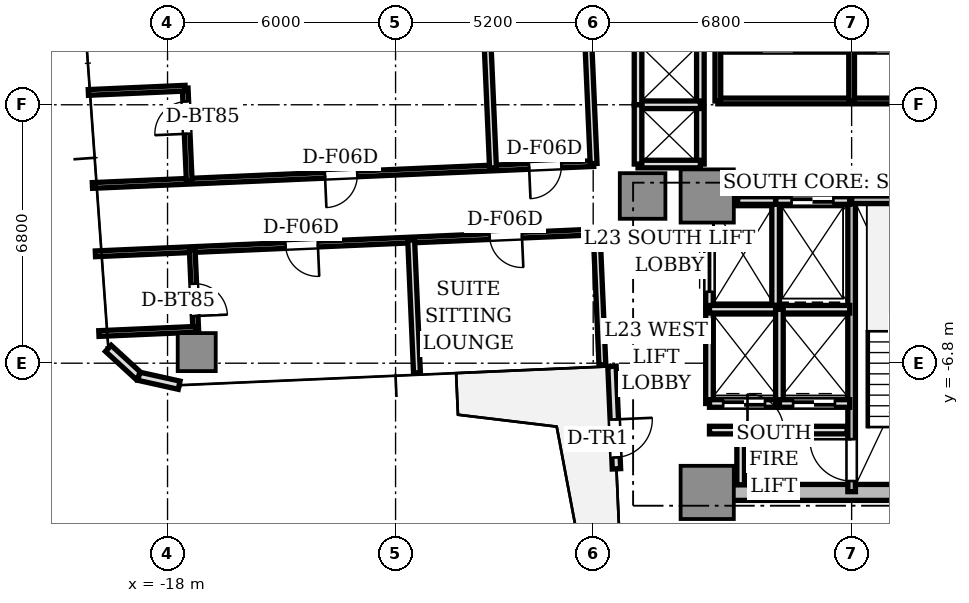
"""IFC4 building model, lengths in metres.
Left out: names, types, materials, properties, quantities, classifications, styles, units other than length and angle.
Written with IfcOpenShell. Run it as: python <this file> out.ifc"""

import sys

from ifc_helpers import new_model, si_unit, direction, frame, frame_2d, origin, origin_2d, place, context, subcontext, project, spatial, rectangle, extrude, source, transform, mapped, element, fill, save


model = new_model("IFC4")
c1 = context("Model", 3, precision=1e-05, world=origin(), true_north=direction((0.0, 1.0)))
c2 = subcontext(c1, "Body", "Model", "MODEL_VIEW")
j1 = project(units=[si_unit("LENGTHUNIT", "METRE"), si_unit("PLANEANGLEUNIT", "RADIAN")], contexts=[c1])
p1 = place(None, origin())
s1 = spatial("IfcSite", under=j1, at=p1, CompositionType="ELEMENT")
p2 = place(p1, origin())
s2 = spatial("IfcBuilding", under=s1, at=p2, CompositionType="ELEMENT")
p3 = place(p2, frame((0.0, 0.0, 86.85)))
s3 = spatial("IfcBuildingStorey", under=s2, at=p3, CompositionType="ELEMENT", Elevation=86.85)
p4 = place(p3, frame((-3.55, -10.2, 0.0), z_axis=(0.0, 0.0, 1.0), x_axis=(1.0, 0.0, 0.0)))
e1 = element("IfcWall", 1, at=p4, inside=s3, PredefinedType="SHEAR", context=c2, shape_type="SweptSolid", body=[
    extrude(rectangle(XDim=7.1, YDim=0.42, at=frame_2d((3.55, 0.0))), origin(), (0.0, 0.0, 1.0), 3.11),
])
m1 = source(origin(), c2, "Body", "SweptSolid", [
    extrude(rectangle(XDim=1.4, YDim=1.4, at=origin_2d()), origin(), (0.0, 0.0, 1.0), 3.11),
])
for number, where, z_axis, x_axis in (
    (2, (-3.8, -2.4, 0.0), (0.0, 0.0, 1.0), (1.0, 0.0, 0.0)),
    (3, (-3.8, -10.2, 0.0), (0.0, 0.0, 1.0), (1.0, 0.0, 0.0)),
):
    element("IfcColumn", number, at=place(p3, frame(where, z_axis=z_axis, x_axis=x_axis)), inside=s3, PredefinedType="COLUMN", context=c2, shape_type="MappedRepresentation", body=[
        mapped(m1, transform((0.0, 0.0, 0.0), scale=1.0)),
    ])
m2 = source(origin(), c2, "Body", "SweptSolid", [
    extrude(rectangle(XDim=1.2, YDim=1.2, at=origin_2d()), origin(), (0.0, 0.0, 1.0), 3.11),
])
p5 = place(p3, frame((-5.5, -2.4, 0.0), z_axis=(0.0, 0.0, 1.0), x_axis=(1.0, 0.0, 0.0)))
e4 = element("IfcColumn", 4, at=p5, inside=s3, PredefinedType="COLUMN", context=c2, shape_type="MappedRepresentation", body=[
    mapped(m2, transform((0.0, 0.0, 0.0), scale=1.0)),
])
m3 = source(origin(), c2, "Body", "SweptSolid", [
    extrude(rectangle(XDim=1.0, YDim=1.0, at=origin_2d()), origin(), (0.0, 0.0, 1.0), 3.11),
])
p6 = place(p3, frame((-17.232, -6.508, 0.0), z_axis=(0.0, 0.0, 1.0), x_axis=(1.0, 0.0, 0.0)))
e5 = element("IfcColumn", 5, at=p6, inside=s3, PredefinedType="COLUMN", context=c2, shape_type="MappedRepresentation", body=[
    mapped(m3, transform((0.0, 0.0, 0.0), scale=1.0)),
])
p7 = place(p3, frame((-19.558, -6.409, 0.0), z_axis=(0.0, 0.0, 1.0), x_axis=(0.737210081318, -0.675663596772, 0.0)))
e6 = element("IfcWall", 6, at=p7, inside=s3, PredefinedType="STANDARD", context=c2, shape_type="SweptSolid", body=[
    extrude(rectangle(XDim=1.087, YDim=0.22, at=frame_2d((0.543, 0.0))), origin(), (0.0, 0.0, 1.0), 3.11),
])
p8 = place(p3, frame((-18.756, -7.144, 0.0), z_axis=(0.0, 0.0, 1.0), x_axis=(0.976282085775, -0.216502399514, 0.0)))
e7 = element("IfcWall", 7, at=p8, inside=s3, PredefinedType="STANDARD", context=c2, shape_type="SweptSolid", body=[
    extrude(rectangle(XDim=1.087, YDim=0.22, at=frame_2d((0.543, 0.0))), origin(), (0.0, 0.0, 1.0), 3.11),
])
p9 = place(p3, frame((-6.306, -6.882, 0.0), z_axis=(0.0, 0.0, 1.0), x_axis=(0.043672655174, -0.999045894436, 0.0)))
e8 = element("IfcWall", 8, at=p9, inside=s3, PredefinedType="STANDARD", context=c2, shape_type="SweptSolid", body=[
    extrude(rectangle(XDim=2.7, YDim=0.22, at=frame_2d((1.35, 0.0))), origin(), (0.0, 0.0, 1.0), 3.11),
])
p10 = place(p9, frame((1.4, 0.0, 0.0)))
e9 = element("IfcOpeningElement", 9, at=p10, cuts=e8, PredefinedType="OPENING", context=c2, shape_type="SweptSolid", body=[
    extrude(rectangle(XDim=1.0, YDim=2.2, at=frame_2d((0.5, 1.1))), frame((0.0, 0.12, 0.0), z_axis=(0.0, -1.0, 0.0), x_axis=(1.0, 0.0, 0.0)), (0.0, 0.0, 1.0), 0.24),
])
p11 = place(p3, frame((0.0, -10.18, 0.0), z_axis=(0.0, 0.0, 1.0), x_axis=(0.0, 1.0, 0.0)))
e10 = element("IfcWall", 10, at=p11, inside=s3, PredefinedType="SOLIDWALL", context=c2, shape_type="SweptSolid", body=[
    extrude(rectangle(XDim=7.68, YDim=0.2, at=frame_2d((3.84, 0.0))), origin(), (0.0, 0.0, 1.0), 3.11),
])
p12 = place(p11, frame((0.28, 0.0, 0.0)))
e11 = element("IfcOpeningElement", 11, at=p12, cuts=e10, PredefinedType="OPENING", context=c2, shape_type="SweptSolid", body=[
    extrude(rectangle(XDim=1.1, YDim=2.15, at=frame_2d((0.55, 1.075))), frame((0.0, 0.11, 0.0), z_axis=(0.0, -1.0, 0.0), x_axis=(1.0, 0.0, 0.0)), (0.0, 0.0, 1.0), 0.22),
])
p13 = place(p3, frame((0.0, -2.5, 0.0), z_axis=(0.0, 0.0, 1.0), x_axis=(1.0, 0.0, 0.0)))
e12 = element("IfcWall", 12, at=p13, inside=s3, PredefinedType="SOLIDWALL", context=c2, shape_type="SweptSolid", body=[
    extrude(rectangle(XDim=3.72, YDim=0.2, at=frame_2d((1.86, 0.0))), origin(), (0.0, 0.0, 1.0), 3.11),
])
p14 = place(p3, frame((-2.0, -5.28, 0.0), z_axis=(0.0, 0.0, 1.0), x_axis=(0.0, 1.0, 0.0)))
e13 = element("IfcWall", 13, at=p14, inside=s3, PredefinedType="SOLIDWALL", context=c2, shape_type="SweptSolid", body=[
    extrude(rectangle(XDim=2.78, YDim=0.2, at=frame_2d((1.39, 0.0))), origin(), (0.0, 0.0, 1.0), 2.66),
])
p15 = place(p3, frame((-2.0, -2.52, 0.0), z_axis=(0.0, 0.0, 1.0), x_axis=(1.0, 0.0, 0.0)))
e14 = element("IfcWall", 14, at=p15, inside=s3, PredefinedType="SOLIDWALL", context=c2, shape_type="SweptSolid", body=[
    extrude(rectangle(XDim=1.95, YDim=0.2, at=frame_2d((0.975, 0.0))), origin(), (0.0, 0.0, 1.0), 2.66),
])
p16 = place(p15, frame((0.42, 0.0, 0.0)))
e15 = element("IfcOpeningElement", 15, at=p16, cuts=e14, PredefinedType="OPENING", context=c2, shape_type="SweptSolid", body=[
    extrude(rectangle(XDim=1.1, YDim=2.2, at=frame_2d((0.55, 1.1))), frame((0.0, 0.11, 0.0), z_axis=(0.0, -1.0, 0.0), x_axis=(1.0, 0.0, 0.0)), (0.0, 0.0, 1.0), 0.22),
])
p17 = place(p3, frame((-3.0, -2.52, 0.0), z_axis=(0.0, 0.0, 1.0), x_axis=(1.0, 0.0, 0.0)))
e16 = element("IfcWall", 16, at=p17, inside=s3, PredefinedType="SOLIDWALL", context=c2, shape_type="SweptSolid", body=[
    extrude(rectangle(XDim=1.0, YDim=0.2, at=frame_2d((0.5, 0.0))), origin(), (0.0, 0.0, 1.0), 2.66),
])
p18 = place(p3, frame((-3.74, -5.36, 0.0), z_axis=(0.0, 0.0, 1.0), x_axis=(0.0, 1.0, 0.0)))
e17 = element("IfcWall", 17, at=p18, inside=s3, PredefinedType="SOLIDWALL", context=c2, shape_type="SweptSolid", body=[
    extrude(rectangle(XDim=2.08, YDim=0.2, at=frame_2d((1.04, 0.0))), origin(), (0.0, 0.0, 1.0), 2.66),
])
p19 = place(p18, frame((0.44, 0.0, 0.0)))
e18 = element("IfcOpeningElement", 18, at=p19, cuts=e17, PredefinedType="OPENING", context=c2, shape_type="SweptSolid", body=[
    extrude(rectangle(XDim=1.2, YDim=2.2, at=frame_2d((0.6, 1.1))), frame((0.0, 0.11, 0.0), z_axis=(0.0, -1.0, 0.0), x_axis=(1.0, 0.0, 0.0)), (0.0, 0.0, 1.0), 0.22),
])
p20 = place(p3, frame((-3.74, -7.86, 0.0), z_axis=(0.0, 0.0, 1.0), x_axis=(0.0, 1.0, 0.0)))
e19 = element("IfcWall", 19, at=p20, inside=s3, PredefinedType="SOLIDWALL", context=c2, shape_type="SweptSolid", body=[
    extrude(rectangle(XDim=2.48, YDim=0.2, at=frame_2d((1.24, 0.0))), origin(), (0.0, 0.0, 1.0), 2.66),
])
p21 = place(p3, frame((-3.74, -7.86, 0.0), z_axis=(0.0, 0.0, 1.0), x_axis=(1.0, 0.0, 0.0)))
e20 = element("IfcWall", 20, at=p21, inside=s3, PredefinedType="SOLIDWALL", context=c2, shape_type="SweptSolid", body=[
    extrude(rectangle(XDim=1.84, YDim=0.2, at=frame_2d((0.92, 0.0))), origin(), (0.0, 0.0, 1.0), 2.66),
])
p22 = place(p21, frame((0.36, 0.0, 0.0)))
e21 = element("IfcOpeningElement", 21, at=p22, cuts=e20, PredefinedType="OPENING", context=c2, shape_type="SweptSolid", body=[
    extrude(rectangle(XDim=1.1, YDim=2.2, at=frame_2d((0.55, 1.1))), frame((0.0, 0.11, 0.0), z_axis=(0.0, -1.0, 0.0), x_axis=(1.0, 0.0, 0.0)), (0.0, 0.0, 1.0), 0.22),
])
p23 = place(p3, frame((-3.74, -5.38, 0.0), z_axis=(0.0, 0.0, 1.0), x_axis=(1.0, 0.0, 0.0)))
e22 = element("IfcWall", 22, at=p23, inside=s3, PredefinedType="SOLIDWALL", context=c2, shape_type="SweptSolid", body=[
    extrude(rectangle(XDim=3.69, YDim=0.2, at=frame_2d((1.845, 0.0))), origin(), (0.0, 0.0, 1.0), 2.66),
])
p24 = place(p3, frame((-1.9, -7.86, 0.0), z_axis=(0.0, 0.0, 1.0), x_axis=(0.0, 1.0, 0.0)))
e23 = element("IfcWall", 23, at=p24, inside=s3, PredefinedType="SOLIDWALL", context=c2, shape_type="SweptSolid", body=[
    extrude(rectangle(XDim=2.48, YDim=0.2, at=frame_2d((1.24, 0.0))), origin(), (0.0, 0.0, 1.0), 2.66),
])
p25 = place(p3, frame((-1.9, -7.86, 0.0), z_axis=(0.0, 0.0, 1.0), x_axis=(1.0, 0.0, 0.0)))
e24 = element("IfcWall", 24, at=p25, inside=s3, PredefinedType="SOLIDWALL", context=c2, shape_type="SweptSolid", body=[
    extrude(rectangle(XDim=1.85, YDim=0.2, at=frame_2d((0.925, 0.0))), origin(), (0.0, 0.0, 1.0), 2.66),
])
p26 = place(p25, frame((0.36, 0.0, 0.0)))
e25 = element("IfcOpeningElement", 25, at=p26, cuts=e24, PredefinedType="OPENING", context=c2, shape_type="SweptSolid", body=[
    extrude(rectangle(XDim=1.1, YDim=2.2, at=frame_2d((0.55, 1.1))), frame((0.0, 0.11, 0.0), z_axis=(0.0, -1.0, 0.0), x_axis=(1.0, 0.0, 0.0)), (0.0, 0.0, 1.0), 0.22),
])
p27 = place(p3, frame((-3.98, -1.56, 0.0), z_axis=(0.0, 0.0, 1.0), x_axis=(0.0, 1.0, 0.0)))
e26 = element("IfcWall", 26, at=p27, inside=s3, PredefinedType="SOLIDWALL", context=c2, shape_type="SweptSolid", body=[
    extrude(rectangle(XDim=3.12, YDim=0.2, at=frame_2d((1.56, 0.0))), origin(), (0.0, 0.0, 1.0), 2.28),
])
for number, where, z_axis, x_axis in (
    (27, (-5.62, -1.56, 0.0), (0.0, 0.0, 1.0), (1.0, 0.0, 0.0)),
    (28, (-5.62, 0.0, 0.0), (0.0, 0.0, 1.0), (1.0, 0.0, 0.0)),
):
    element("IfcWall", number, at=place(p3, frame(where, z_axis=z_axis, x_axis=x_axis)), inside=s3, PredefinedType="SOLIDWALL", context=c2, shape_type="SweptSolid", body=[
        extrude(rectangle(XDim=1.64, YDim=0.2, at=frame_2d((0.82, 0.0))), origin(), (0.0, 0.0, 1.0), 2.66),
    ])
for number, where, z_axis, x_axis in (
    (29, (-5.62, 0.0, 0.0), (0.0, 0.0, 1.0), (0.0, 1.0, 0.0)),
    (30, (-5.62, -1.56, 0.0), (0.0, 0.0, 1.0), (0.0, 1.0, 0.0)),
):
    element("IfcWall", number, at=place(p3, frame(where, z_axis=z_axis, x_axis=x_axis)), inside=s3, PredefinedType="SOLIDWALL", context=c2, shape_type="SweptSolid", body=[
        extrude(rectangle(XDim=1.56, YDim=0.2, at=frame_2d((0.78, 0.0))), origin(), (0.0, 0.0, 1.0), 2.66),
    ])
p28 = place(p3, frame((-3.74, -8.56, 0.0), z_axis=(0.0, 0.0, 1.0), x_axis=(1.0, 0.0, 0.0)))
e31 = element("IfcWall", 31, at=p28, inside=s3, PredefinedType="SOLIDWALL", context=c2, shape_type="SweptSolid", body=[
    extrude(rectangle(XDim=3.62, YDim=0.2, at=frame_2d((1.81, 0.0))), origin(), (0.0, 0.0, 1.0), 2.66),
])
p29 = place(p28, frame((1.0, 0.0, 0.0)))
e32 = element("IfcOpeningElement", 32, at=p29, cuts=e31, PredefinedType="OPENING", context=c2, shape_type="SweptSolid", body=[
    extrude(rectangle(XDim=0.95, YDim=2.15, at=frame_2d((0.475, 1.075))), frame((0.0, 0.11, 0.0), z_axis=(0.0, -1.0, 0.0), x_axis=(1.0, 0.0, 0.0)), (0.0, 0.0, 1.0), 0.22),
])
p30 = place(p3, frame((-2.92, -10.0, 0.0), z_axis=(0.0, 0.0, 1.0), x_axis=(0.0, 1.0, 0.0)))
e33 = element("IfcWall", 33, at=p30, inside=s3, PredefinedType="SOLIDWALL", context=c2, shape_type="SweptSolid", body=[
    extrude(rectangle(XDim=1.44, YDim=0.2, at=frame_2d((0.72, 0.0))), origin(), (0.0, 0.0, 1.0), 2.66),
])
p31 = place(p3, frame((-3.52, 0.1, 0.0), z_axis=(0.0, 0.0, 1.0), x_axis=(1.0, 0.0, 0.0)))
e34 = element("IfcWall", 34, at=p31, inside=s3, PredefinedType="PARTITIONING", context=c2, shape_type="SweptSolid", body=[
    extrude(rectangle(XDim=5.68, YDim=0.15, at=frame_2d((2.84, 0.0))), origin(), (0.0, 0.0, 1.0), 2.66),
])
p32 = place(p3, frame((-3.52, 0.1, 0.0), z_axis=(0.0, 0.0, 1.0), x_axis=(0.0, 1.0, 0.0)))
e35 = element("IfcWall", 35, at=p32, inside=s3, PredefinedType="PARTITIONING", context=c2, shape_type="SweptSolid", body=[
    extrude(rectangle(XDim=1.36, YDim=0.15, at=frame_2d((0.68, 0.0))), origin(), (0.0, 0.0, 1.0), 2.28),
])
p33 = place(p3, frame((0.0, 0.1, 0.0), z_axis=(0.0, 0.0, 1.0), x_axis=(0.0, 1.0, 0.0)))
e36 = element("IfcWall", 36, at=p33, inside=s3, PredefinedType="PARTITIONING", context=c2, shape_type="SweptSolid", body=[
    extrude(rectangle(XDim=1.36, YDim=0.15, at=frame_2d((0.68, 0.0))), origin(), (0.0, 0.0, 1.0), 2.66),
])
p34 = place(p3, frame((-6.71, -3.346, 0.0), z_axis=(0.0, 0.0, 1.0), x_axis=(-0.999048535483, -0.04361219725, 0.0)))
e37 = element("IfcWall", 37, at=p34, inside=s3, PredefinedType="PARTITIONING", context=c2, shape_type="SweptSolid", body=[
    extrude(rectangle(XDim=13.2, YDim=0.15, at=frame_2d((6.6, 0.0))), origin(), (0.0, 0.0, 1.0), 2.63),
])
p35 = place(p34, frame((1.967, 0.0, 0.0)))
e38 = element("IfcOpeningElement", 38, at=p35, cuts=e37, PredefinedType="OPENING", context=c2, shape_type="SweptSolid", body=[
    extrude(rectangle(XDim=0.85, YDim=2.1, at=frame_2d((0.425, 1.05))), frame((0.0, 0.085, 0.0), z_axis=(0.0, -1.0, 0.0), x_axis=(1.0, 0.0, 0.0)), (0.0, 0.0, 1.0), 0.17),
])
p36 = place(p34, frame((7.342, 0.0, 0.0)))
e39 = element("IfcOpeningElement", 39, at=p36, cuts=e37, PredefinedType="OPENING", context=c2, shape_type="SweptSolid", body=[
    extrude(rectangle(XDim=0.85, YDim=2.1, at=frame_2d((0.425, 1.05))), frame((0.0, 0.085, 0.0), z_axis=(0.0, -1.0, 0.0), x_axis=(1.0, 0.0, 0.0)), (0.0, 0.0, 1.0), 0.17),
])
p37 = place(p3, frame((-6.789, -1.548, 0.0), z_axis=(0.0, 0.0, 1.0), x_axis=(-0.999048500303, -0.043613003123, 0.0)))
e40 = element("IfcWall", 40, at=p37, inside=s3, PredefinedType="PARTITIONING", context=c2, shape_type="SweptSolid", body=[
    extrude(rectangle(XDim=13.2, YDim=0.15, at=frame_2d((6.6, 0.0))), origin(), (0.0, 0.0, 1.0), 2.66),
])
p38 = place(p37, frame((0.85, 0.0, 0.0)))
e41 = element("IfcOpeningElement", 41, at=p38, cuts=e40, PredefinedType="OPENING", context=c2, shape_type="SweptSolid", body=[
    extrude(rectangle(XDim=0.85, YDim=2.1, at=frame_2d((0.425, 1.05))), frame((0.0, 0.085, 0.0), z_axis=(0.0, -1.0, 0.0), x_axis=(1.0, 0.0, 0.0)), (0.0, 0.0, 1.0), 0.17),
])
p39 = place(p37, frame((6.225, 0.0, 0.0)))
e42 = element("IfcOpeningElement", 42, at=p39, cuts=e40, PredefinedType="OPENING", context=c2, shape_type="SweptSolid", body=[
    extrude(rectangle(XDim=0.85, YDim=2.1, at=frame_2d((0.425, 1.05))), frame((0.0, 0.085, 0.0), z_axis=(0.0, -1.0, 0.0), x_axis=(1.0, 0.0, 0.0)), (0.0, 0.0, 1.0), 0.17),
])
p40 = place(p3, frame((-6.71, -3.346, 0.0), z_axis=(0.0, 0.0, 1.0), x_axis=(0.043597663116, -0.999049169846, 0.0)))
e43 = element("IfcWall", 43, at=p40, inside=s3, PredefinedType="PARTITIONING", context=c2, shape_type="SweptSolid", body=[
    extrude(rectangle(XDim=3.5, YDim=0.18, at=frame_2d((1.75, 0.0))), origin(), (0.0, 0.0, 1.0), 2.66),
])
p41 = place(p3, frame((-7.129, 6.245, 0.0), z_axis=(0.0, 0.0, 1.0), x_axis=(0.043600217373, -0.999049058378, 0.0)))
e44 = element("IfcWall", 44, at=p41, inside=s3, PredefinedType="PARTITIONING", context=c2, shape_type="SweptSolid", body=[
    extrude(rectangle(XDim=7.8, YDim=0.18, at=frame_2d((3.9, 0.0))), origin(), (0.0, 0.0, 1.0), 2.66),
])
p42 = place(p3, frame((-11.59, -3.559, 0.0), z_axis=(0.0, 0.0, 1.0), x_axis=(0.04366424353, -0.99904626211, 0.0)))
e45 = element("IfcWall", 45, at=p42, inside=s3, PredefinedType="PARTITIONING", context=c2, shape_type="SweptSolid", body=[
    extrude(rectangle(XDim=3.5, YDim=0.18, at=frame_2d((1.75, 0.0))), origin(), (0.0, 0.0, 1.0), 2.66),
])
p43 = place(p3, frame((-17.35, -3.81, 0.0), z_axis=(0.0, 0.0, 1.0), x_axis=(0.043593612401, -0.999049346608, 0.0)))
e46 = element("IfcWall", 46, at=p43, inside=s3, PredefinedType="PARTITIONING", context=c2, shape_type="SweptSolid", body=[
    extrude(rectangle(XDim=2.1, YDim=0.15, at=frame_2d((1.05, 0.0))), origin(), (0.0, 0.0, 1.0), 2.58),
])
p44 = place(p43, frame((0.9, 0.0, 0.0)))
e47 = element("IfcOpeningElement", 47, at=p44, cuts=e46, PredefinedType="OPENING", context=c2, shape_type="SweptSolid", body=[
    extrude(rectangle(XDim=0.85, YDim=2.1, at=frame_2d((0.425, 1.05))), frame((0.0, 0.085, 0.0), z_axis=(0.0, -1.0, 0.0), x_axis=(1.0, 0.0, 0.0)), (0.0, 0.0, 1.0), 0.17),
])
p45 = place(p3, frame((-17.259, -5.908, 0.0), z_axis=(0.0, 0.0, 1.0), x_axis=(-0.999046560091, -0.043657425146, 0.0)))
e48 = element("IfcWall", 48, at=p45, inside=s3, PredefinedType="PARTITIONING", context=c2, shape_type="SweptSolid", body=[
    extrude(rectangle(XDim=2.55, YDim=0.15, at=frame_2d((1.275, 0.0))), origin(), (0.0, 0.0, 1.0), 2.66),
])
p46 = place(p3, frame((-9.436, -1.663, 0.0), z_axis=(0.0, 0.0, 1.0), x_axis=(-0.043632821702, 0.999047634936, 0.0)))
e49 = element("IfcWall", 49, at=p46, inside=s3, PredefinedType="PARTITIONING", context=c2, shape_type="SweptSolid", body=[
    extrude(rectangle(XDim=7.8, YDim=0.18, at=frame_2d((3.9, 0.0))), origin(), (0.0, 0.0, 1.0), 2.66),
])
p47 = place(p3, frame((-17.429, -2.012, 0.0), z_axis=(0.0, 0.0, 1.0), x_axis=(-0.043644787072, 0.999047112283, 0.0)))
e50 = element("IfcWall", 50, at=p47, inside=s3, PredefinedType="PARTITIONING", context=c2, shape_type="SweptSolid", body=[
    extrude(rectangle(XDim=2.45, YDim=0.15, at=frame_2d((1.225, 0.0))), origin(), (0.0, 0.0, 1.0), 2.58),
])
p48 = place(p47, frame((1.25, 0.0, 0.0)))
e51 = element("IfcOpeningElement", 51, at=p48, cuts=e50, PredefinedType="OPENING", context=c2, shape_type="SweptSolid", body=[
    extrude(rectangle(XDim=0.85, YDim=2.1, at=frame_2d((0.425, 1.05))), frame((0.0, 0.085, 0.0), z_axis=(0.0, -1.0, 0.0), x_axis=(1.0, 0.0, 0.0)), (0.0, 0.0, 1.0), 0.17),
])
p49 = place(p3, frame((-17.536, 0.436, 0.0), z_axis=(0.0, 0.0, 1.0), x_axis=(-0.999046560091, -0.043657425146, 0.0)))
e52 = element("IfcWall", 52, at=p49, inside=s3, PredefinedType="PARTITIONING", context=c2, shape_type="SweptSolid", body=[
    extrude(rectangle(XDim=2.55, YDim=0.15, at=frame_2d((1.275, 0.0))), origin(), (0.0, 0.0, 1.0), 2.66),
])
p50 = place(p3, frame((-3.851, -11.529, 0.0), z_axis=(0.0, 0.0, 1.0), x_axis=(0.999048663393, 0.043609267053, 0.0)))
e53 = element("IfcWall", 53, at=p50, inside=s3, PredefinedType="PARTITIONING", context=c2, shape_type="SweptSolid", body=[
    extrude(rectangle(XDim=10.9, YDim=0.18, at=frame_2d((5.45, 0.0))), origin(), (0.0, 0.0, 1.0), 2.66),
])
m4 = source(origin(), c2, "Body", "SweptSolid", [
    extrude(rectangle(XDim=1.0, YDim=0.05, at=origin_2d()), origin(), (0.0, 0.0, 1.0), 2.2),
])
p51 = place(p10, frame((0.5, 0.0, 0.0)))
e54 = element("IfcDoor", 54, at=p51, inside=s3, OperationType="SINGLE_SWING_LEFT", PredefinedType="DOOR", context=c2, shape_type="MappedRepresentation", body=[
    mapped(m4, transform((0.0, 0.0, 0.0), scale=1.0)),
])
fill(e9, e54)
m5 = source(origin(), c2, "Body", "SweptSolid", [
    extrude(rectangle(XDim=1.1, YDim=0.05, at=origin_2d()), origin(), (0.0, 0.0, 1.0), 2.2),
])
p52 = place(p16, frame((0.55, 0.0, 0.0)))
e55 = element("IfcDoor", 55, at=p52, inside=s3, OperationType="DOUBLE_DOOR_SLIDING", PredefinedType="DOOR", context=c2, shape_type="MappedRepresentation", body=[
    mapped(m5, transform((0.0, 0.0, 0.0), scale=1.0)),
])
fill(e15, e55)
m6 = source(origin(), c2, "Body", "SweptSolid", [
    extrude(rectangle(XDim=1.2, YDim=0.05, at=origin_2d()), origin(), (0.0, 0.0, 1.0), 2.2),
])
p53 = place(p19, frame((0.6, 0.0, 0.0)))
e56 = element("IfcDoor", 56, at=p53, inside=s3, OperationType="DOUBLE_DOOR_SLIDING", PredefinedType="DOOR", context=c2, shape_type="MappedRepresentation", body=[
    mapped(m6, transform((0.0, 0.0, 0.0), scale=1.0)),
])
fill(e18, e56)
p54 = place(p22, frame((0.55, 0.0, 0.0)))
e57 = element("IfcDoor", 57, at=p54, inside=s3, OperationType="DOUBLE_DOOR_SLIDING", PredefinedType="DOOR", context=c2, shape_type="MappedRepresentation", body=[
    mapped(m5, transform((0.0, 0.0, 0.0), scale=1.0)),
])
fill(e21, e57)
p55 = place(p26, frame((0.55, 0.0, 0.0)))
e58 = element("IfcDoor", 58, at=p55, inside=s3, OperationType="DOUBLE_DOOR_SLIDING", PredefinedType="DOOR", context=c2, shape_type="MappedRepresentation", body=[
    mapped(m5, transform((0.0, 0.0, 0.0), scale=1.0)),
])
fill(e25, e58)
m7 = source(origin(), c2, "Body", "SweptSolid", [
    extrude(rectangle(XDim=1.1, YDim=0.05, at=origin_2d()), origin(), (0.0, 0.0, 1.0), 2.15),
])
p56 = place(p12, frame((0.55, 0.0, 0.0)))
e59 = element("IfcDoor", 59, at=p56, inside=s3, OperationType="SINGLE_SWING_RIGHT", PredefinedType="DOOR", context=c2, shape_type="MappedRepresentation", body=[
    mapped(m7, transform((0.0, 0.0, 0.0), scale=1.0)),
])
fill(e11, e59)
m8 = source(origin(), c2, "Body", "SweptSolid", [
    extrude(rectangle(XDim=0.95, YDim=0.05, at=origin_2d()), origin(), (0.0, 0.0, 1.0), 2.15),
])
p57 = place(p29, frame((0.475, 0.0, 0.0)))
e60 = element("IfcDoor", 60, at=p57, inside=s3, OperationType="SINGLE_SWING_LEFT", PredefinedType="DOOR", context=c2, shape_type="MappedRepresentation", body=[
    mapped(m8, transform((0.0, 0.0, 0.0), scale=1.0)),
])
fill(e32, e60)
m9 = source(origin(), c2, "Body", "SweptSolid", [
    extrude(rectangle(XDim=0.85, YDim=0.05, at=origin_2d()), origin(), (0.0, 0.0, 1.0), 2.1),
])
p58 = place(p35, frame((0.425, 0.0, 0.0)))
e61 = element("IfcDoor", 61, at=p58, inside=s3, OperationType="SINGLE_SWING_LEFT", PredefinedType="DOOR", context=c2, shape_type="MappedRepresentation", body=[
    mapped(m9, transform((0.0, 0.0, 0.0), scale=1.0)),
])
fill(e38, e61)
p59 = place(p44, frame((0.425, 0.0, 0.0)))
e62 = element("IfcDoor", 62, at=p59, inside=s3, OperationType="SINGLE_SWING_RIGHT", PredefinedType="DOOR", context=c2, shape_type="MappedRepresentation", body=[
    mapped(m9, transform((0.0, 0.0, 0.0), scale=1.0)),
])
fill(e47, e62)
p60 = place(p36, frame((0.425, 0.0, 0.0)))
e63 = element("IfcDoor", 63, at=p60, inside=s3, OperationType="SINGLE_SWING_LEFT", PredefinedType="DOOR", context=c2, shape_type="MappedRepresentation", body=[
    mapped(m9, transform((0.0, 0.0, 0.0), scale=1.0)),
])
fill(e39, e63)
p61 = place(p38, frame((0.425, 0.0, 0.0)))
e64 = element("IfcDoor", 64, at=p61, inside=s3, OperationType="SINGLE_SWING_RIGHT", PredefinedType="DOOR", context=c2, shape_type="MappedRepresentation", body=[
    mapped(m9, transform((0.0, 0.0, 0.0), scale=1.0)),
])
fill(e41, e64)
p62 = place(p48, frame((0.425, 0.0, 0.0)))
e65 = element("IfcDoor", 65, at=p62, inside=s3, OperationType="SINGLE_SWING_LEFT", PredefinedType="DOOR", context=c2, shape_type="MappedRepresentation", body=[
    mapped(m9, transform((0.0, 0.0, 0.0), scale=1.0)),
])
fill(e51, e65)
p63 = place(p39, frame((0.425, 0.0, 0.0)))
e66 = element("IfcDoor", 66, at=p63, inside=s3, OperationType="SINGLE_SWING_RIGHT", PredefinedType="DOOR", context=c2, shape_type="MappedRepresentation", body=[
    mapped(m9, transform((0.0, 0.0, 0.0), scale=1.0)),
])
fill(e42, e66)
save(model, sys.argv[1])
